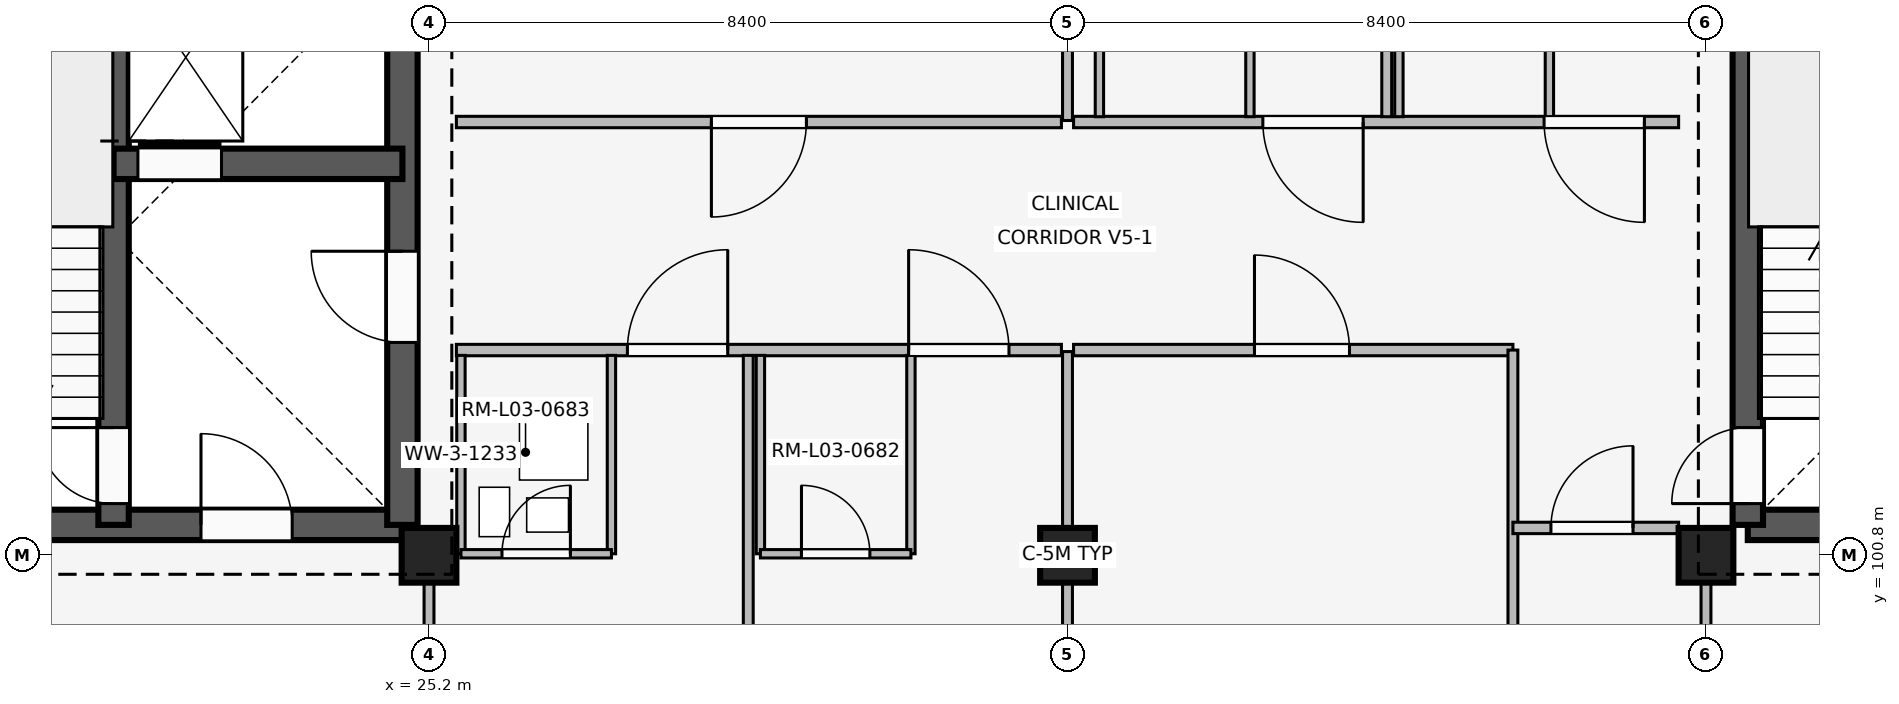
"""IFC4 building model, lengths in metres.
Left out: names, types, materials, properties, quantities, classifications, styles, units other than length and angle.
Written with IfcOpenShell. Run it as: python <this file> out.ifc"""

import sys

from ifc_helpers import new_model, si_unit, direction, frame, frame_2d, origin, origin_2d, place, context, subcontext, project, spatial, rectangle, extrude, element, fill, save


model = new_model("IFC4")
c1 = context("Model", 3, precision=1e-05, world=origin(), true_north=direction((0.0, 1.0)))
c2 = subcontext(c1, "Body", "Model", "MODEL_VIEW")
j1 = project(units=[si_unit("LENGTHUNIT", "METRE"), si_unit("PLANEANGLEUNIT", "RADIAN")], contexts=[c1])
p1 = place(None, origin())
s1 = spatial("IfcSite", under=j1, at=p1, CompositionType="ELEMENT")
p2 = place(p1, origin())
s2 = spatial("IfcBuilding", under=s1, at=p2, CompositionType="ELEMENT")
p3 = place(p2, frame((0.0, 0.0, 12.9)))
s3 = spatial("IfcBuildingStorey", under=s2, at=p3, CompositionType="ELEMENT", Elevation=12.9)
for number, where, z_axis, x_axis in (
    (1, (25.2, 100.8, 0.0), (0.0, 0.0, 1.0), (1.0, 0.0, 0.0)),
    (2, (33.6, 100.8, 0.0), (0.0, 0.0, 1.0), (1.0, 0.0, 0.0)),
    (3, (42.0, 100.8, 0.0), (0.0, 0.0, 1.0), (1.0, 0.0, 0.0)),
):
    element("IfcColumn", number, at=place(p3, frame(where, z_axis=z_axis, x_axis=x_axis)), inside=s3, PredefinedType="COLUMN", context=c2, shape_type="SweptSolid", body=[
        extrude(rectangle(XDim=0.72, YDim=0.72, at=origin_2d()), origin(), (0.0, 0.0, 1.0), 3.3),
    ])
p4 = place(p3, frame((42.55, 101.2, 0.0), z_axis=(0.0, 0.0, 1.0), x_axis=(1.0, 0.0, 0.0)))
e4 = element("IfcWall", 4, at=p4, inside=s3, PredefinedType="SHEAR", context=c2, shape_type="SweptSolid", body=[
    extrude(rectangle(XDim=7.5, YDim=0.4, at=frame_2d((3.75, 0.0))), origin(), (0.0, 0.0, 1.0), 3.02),
])
p5 = place(p4, frame((4.85, 0.0, 0.0)))
e5 = element("IfcOpeningElement", 5, at=p5, cuts=e4, PredefinedType="OPENING", context=c2, shape_type="SweptSolid", body=[
    extrude(rectangle(XDim=1.2, YDim=2.2, at=frame_2d((0.6, 1.1))), frame((0.0, 0.21, 0.0), z_axis=(0.0, -1.0, 0.0), x_axis=(1.0, 0.0, 0.0)), (0.0, 0.0, 1.0), 0.42),
])
p6 = place(p3, frame((42.55, 101.2, 0.0), z_axis=(0.0, 0.0, 1.0), x_axis=(0.0, 1.0, 0.0)))
e6 = element("IfcWall", 6, at=p6, inside=s3, PredefinedType="SHEAR", context=c2, shape_type="SweptSolid", body=[
    extrude(rectangle(XDim=7.55, YDim=0.4, at=frame_2d((3.775, 0.0))), origin(), (0.0, 0.0, 1.0), 3.02),
])
p7 = place(p6, frame((0.28, 0.0, 0.0)))
e7 = element("IfcOpeningElement", 7, at=p7, cuts=e6, PredefinedType="OPENING", context=c2, shape_type="SweptSolid", body=[
    extrude(rectangle(XDim=1.0, YDim=2.15, at=frame_2d((0.5, 1.075))), frame((0.0, 0.21, 0.0), z_axis=(0.0, -1.0, 0.0), x_axis=(1.0, 0.0, 0.0)), (0.0, 0.0, 1.0), 0.42),
])
p8 = place(p3, frame((17.35, 101.2, 0.0), z_axis=(0.0, 0.0, 1.0), x_axis=(1.0, 0.0, 0.0)))
e8 = element("IfcWall", 8, at=p8, inside=s3, PredefinedType="SHEAR", context=c2, shape_type="SweptSolid", body=[
    extrude(rectangle(XDim=7.5, YDim=0.4, at=frame_2d((3.75, 0.0))), origin(), (0.0, 0.0, 1.0), 3.02),
])
p9 = place(p8, frame((4.85, 0.0, 0.0)))
e9 = element("IfcOpeningElement", 9, at=p9, cuts=e8, PredefinedType="OPENING", context=c2, shape_type="SweptSolid", body=[
    extrude(rectangle(XDim=1.2, YDim=2.2, at=frame_2d((0.6, 1.1))), frame((0.0, 0.21, 0.0), z_axis=(0.0, -1.0, 0.0), x_axis=(1.0, 0.0, 0.0)), (0.0, 0.0, 1.0), 0.42),
])
p10 = place(p3, frame((24.85, 101.2, 0.0), z_axis=(0.0, 0.0, 1.0), x_axis=(0.0, 1.0, 0.0)))
e10 = element("IfcWall", 10, at=p10, inside=s3, PredefinedType="SHEAR", context=c2, shape_type="SweptSolid", body=[
    extrude(rectangle(XDim=7.55, YDim=0.4, at=frame_2d((3.775, 0.0))), origin(), (0.0, 0.0, 1.0), 3.02),
])
p11 = place(p10, frame((2.4, 0.0, 0.0)))
e11 = element("IfcOpeningElement", 11, at=p11, cuts=e10, PredefinedType="OPENING", context=c2, shape_type="SweptSolid", body=[
    extrude(rectangle(XDim=1.2, YDim=2.2, at=frame_2d((0.6, 1.1))), frame((0.0, 0.21, 0.0), z_axis=(0.0, -1.0, 0.0), x_axis=(1.0, 0.0, 0.0)), (0.0, 0.0, 1.0), 0.42),
])
p12 = place(p3, frame((21.05, 101.2, 0.0), z_axis=(0.0, 0.0, 1.0), x_axis=(0.0, 1.0, 0.0)))
e12 = element("IfcWall", 12, at=p12, inside=s3, PredefinedType="SHEAR", context=c2, shape_type="SweptSolid", body=[
    extrude(rectangle(XDim=7.55, YDim=0.4, at=frame_2d((3.775, 0.0))), origin(), (0.0, 0.0, 1.0), 3.02),
])
p13 = place(p12, frame((0.28, 0.0, 0.0)))
e13 = element("IfcOpeningElement", 13, at=p13, cuts=e12, PredefinedType="OPENING", context=c2, shape_type="SweptSolid", body=[
    extrude(rectangle(XDim=1.0, YDim=2.15, at=frame_2d((0.5, 1.075))), frame((0.0, 0.21, 0.0), z_axis=(0.0, -1.0, 0.0), x_axis=(1.0, 0.0, 0.0)), (0.0, 0.0, 1.0), 0.42),
])
p14 = place(p3, frame((21.05, 105.95, 0.0), z_axis=(0.0, 0.0, 1.0), x_axis=(1.0, 0.0, 0.0)))
e14 = element("IfcWall", 14, at=p14, inside=s3, PredefinedType="SHEAR", context=c2, shape_type="SweptSolid", body=[
    extrude(rectangle(XDim=3.8, YDim=0.4, at=frame_2d((1.9, 0.0))), origin(), (0.0, 0.0, 1.0), 3.02),
])
p15 = place(p14, frame((0.32, 0.0, 0.0)))
e15 = element("IfcOpeningElement", 15, at=p15, cuts=e14, PredefinedType="OPENING", context=c2, shape_type="SweptSolid", body=[
    extrude(rectangle(XDim=1.1, YDim=2.15, at=frame_2d((0.55, 1.075))), frame((0.0, 0.21, 0.0), z_axis=(0.0, -1.0, 0.0), x_axis=(1.0, 0.0, 0.0)), (0.0, 0.0, 1.0), 0.42),
])
p16 = place(p3, frame((25.2, 92.54, 0.0), z_axis=(0.0, 0.0, 1.0), x_axis=(0.0, 1.0, 0.0)))
e16 = element("IfcWall", 16, at=p16, inside=s3, PredefinedType="PARTITIONING", context=c2, shape_type="SweptSolid", body=[
    extrude(rectangle(XDim=8.21, YDim=0.13, at=frame_2d((4.105, 0.0))), origin(), (0.0, 0.0, 1.0), 2.42),
])
p17 = place(p16, frame((3.64, 0.0, 0.0)))
e17 = element("IfcOpeningElement", 17, at=p17, cuts=e16, PredefinedType="OPENING", context=c2, shape_type="SweptSolid", body=[
    extrude(rectangle(XDim=1.08, YDim=2.15, at=frame_2d((0.54, 1.075))), frame((0.0, 0.075, 0.0), z_axis=(0.0, -1.0, 0.0), x_axis=(1.0, 0.0, 0.0)), (0.0, 0.0, 1.0), 0.15),
])
p18 = place(p3, frame((25.56, 103.5, 0.0), z_axis=(0.0, 0.0, 1.0), x_axis=(1.0, 0.0, 0.0)))
e18 = element("IfcWall", 18, at=p18, inside=s3, PredefinedType="PARTITIONING", context=c2, shape_type="SweptSolid", body=[
    extrude(rectangle(XDim=7.96, YDim=0.15, at=frame_2d((3.98, 0.0))), origin(), (0.0, 0.0, 1.0), 2.42),
])
p19 = place(p18, frame((2.25, 0.0, 0.0)))
e19 = element("IfcOpeningElement", 19, at=p19, cuts=e18, PredefinedType="OPENING", context=c2, shape_type="SweptSolid", body=[
    extrude(rectangle(XDim=1.32, YDim=2.25, at=frame_2d((0.66, 1.125))), frame((0.0, 0.085, 0.0), z_axis=(0.0, -1.0, 0.0), x_axis=(1.0, 0.0, 0.0)), (0.0, 0.0, 1.0), 0.17),
])
p20 = place(p18, frame((5.95, 0.0, 0.0)))
e20 = element("IfcOpeningElement", 20, at=p20, cuts=e18, PredefinedType="OPENING", context=c2, shape_type="SweptSolid", body=[
    extrude(rectangle(XDim=1.32, YDim=2.25, at=frame_2d((0.66, 1.125))), frame((0.0, 0.085, 0.0), z_axis=(0.0, -1.0, 0.0), x_axis=(1.0, 0.0, 0.0)), (0.0, 0.0, 1.0), 0.17),
])
p21 = place(p3, frame((29.4, 92.5, 0.0), z_axis=(0.0, 0.0, 1.0), x_axis=(0.0, 1.0, 0.0)))
e21 = element("IfcWall", 21, at=p21, inside=s3, PredefinedType="PARTITIONING", context=c2, shape_type="SweptSolid", body=[
    extrude(rectangle(XDim=10.93, YDim=0.13, at=frame_2d((5.465, 0.0))), origin(), (0.0, 0.0, 1.0), 2.42),
])
for number, where, z_axis, x_axis in (
    (22, (25.62, 100.82, 0.0), (0.0, 0.0, 1.0), (0.0, 1.0, 0.0)),
    (23, (27.6, 100.82, 0.0), (0.0, 0.0, 1.0), (0.0, 1.0, 0.0)),
):
    element("IfcWall", number, at=place(p3, frame(where, z_axis=z_axis, x_axis=x_axis)), inside=s3, PredefinedType="PARTITIONING", context=c2, shape_type="SweptSolid", body=[
        extrude(rectangle(XDim=2.61, YDim=0.11, at=frame_2d((1.305, 0.0))), origin(), (0.0, 0.0, 1.0), 2.42),
    ])
p22 = place(p3, frame((25.62, 100.82, 0.0), z_axis=(0.0, 0.0, 1.0), x_axis=(1.0, 0.0, 0.0)))
e24 = element("IfcWall", 24, at=p22, inside=s3, PredefinedType="PARTITIONING", context=c2, shape_type="SweptSolid", body=[
    extrude(rectangle(XDim=1.98, YDim=0.11, at=frame_2d((0.99, 0.0))), origin(), (0.0, 0.0, 1.0), 2.42),
])
p23 = place(p22, frame((0.54, 0.0, 0.0)))
e25 = element("IfcOpeningElement", 25, at=p23, cuts=e24, PredefinedType="OPENING", context=c2, shape_type="SweptSolid", body=[
    extrude(rectangle(XDim=0.9, YDim=2.1, at=frame_2d((0.45, 1.05))), frame((0.0, 0.065, 0.0), z_axis=(0.0, -1.0, 0.0), x_axis=(1.0, 0.0, 0.0)), (0.0, 0.0, 1.0), 0.13),
])
for number, where, z_axis, x_axis in (
    (26, (29.56, 100.82, 0.0), (0.0, 0.0, 1.0), (0.0, 1.0, 0.0)),
    (27, (31.54, 100.82, 0.0), (0.0, 0.0, 1.0), (0.0, 1.0, 0.0)),
):
    element("IfcWall", number, at=place(p3, frame(where, z_axis=z_axis, x_axis=x_axis)), inside=s3, PredefinedType="PARTITIONING", context=c2, shape_type="SweptSolid", body=[
        extrude(rectangle(XDim=2.61, YDim=0.11, at=frame_2d((1.305, 0.0))), origin(), (0.0, 0.0, 1.0), 2.42),
    ])
p24 = place(p3, frame((29.56, 100.82, 0.0), z_axis=(0.0, 0.0, 1.0), x_axis=(1.0, 0.0, 0.0)))
e28 = element("IfcWall", 28, at=p24, inside=s3, PredefinedType="PARTITIONING", context=c2, shape_type="SweptSolid", body=[
    extrude(rectangle(XDim=1.98, YDim=0.11, at=frame_2d((0.99, 0.0))), origin(), (0.0, 0.0, 1.0), 2.42),
])
p25 = place(p24, frame((0.54, 0.0, 0.0)))
e29 = element("IfcOpeningElement", 29, at=p25, cuts=e28, PredefinedType="OPENING", context=c2, shape_type="SweptSolid", body=[
    extrude(rectangle(XDim=0.9, YDim=2.1, at=frame_2d((0.45, 1.05))), frame((0.0, 0.065, 0.0), z_axis=(0.0, -1.0, 0.0), x_axis=(1.0, 0.0, 0.0)), (0.0, 0.0, 1.0), 0.13),
])
p26 = place(p3, frame((33.52, 106.5, 0.0), z_axis=(0.0, 0.0, 1.0), x_axis=(-1.0, 0.0, 0.0)))
e30 = element("IfcWall", 30, at=p26, inside=s3, PredefinedType="PARTITIONING", context=c2, shape_type="SweptSolid", body=[
    extrude(rectangle(XDim=7.96, YDim=0.15, at=frame_2d((3.98, 0.0))), origin(), (0.0, 0.0, 1.0), 2.42),
])
p27 = place(p26, frame((3.355, 0.0, 0.0)))
e31 = element("IfcOpeningElement", 31, at=p27, cuts=e30, PredefinedType="OPENING", context=c2, shape_type="SweptSolid", body=[
    extrude(rectangle(XDim=1.25, YDim=2.2, at=frame_2d((0.625, 1.1))), frame((0.0, 0.085, 0.0), z_axis=(0.0, -1.0, 0.0), x_axis=(1.0, 0.0, 0.0)), (0.0, 0.0, 1.0), 0.17),
])
for number, where, z_axis, x_axis in (
    (32, (33.6, 92.54, 0.0), (0.0, 0.0, 1.0), (0.0, 1.0, 0.0)),
    (33, (33.6, 106.52, 0.0), (0.0, 0.0, 1.0), (0.0, 1.0, 0.0)),
):
    element("IfcWall", number, at=place(p3, frame(where, z_axis=z_axis, x_axis=x_axis)), inside=s3, PredefinedType="PARTITIONING", context=c2, shape_type="SweptSolid", body=[
        extrude(rectangle(XDim=10.94, YDim=0.13, at=frame_2d((5.47, 0.0))), origin(), (0.0, 0.0, 1.0), 2.42),
    ])
p28 = place(p3, frame((33.68, 103.5, 0.0), z_axis=(0.0, 0.0, 1.0), x_axis=(1.0, 0.0, 0.0)))
e34 = element("IfcWall", 34, at=p28, inside=s3, PredefinedType="PARTITIONING", context=c2, shape_type="SweptSolid", body=[
    extrude(rectangle(XDim=5.78, YDim=0.15, at=frame_2d((2.89, 0.0))), origin(), (0.0, 0.0, 1.0), 2.42),
])
p29 = place(p28, frame((2.38, 0.0, 0.0)))
e35 = element("IfcOpeningElement", 35, at=p29, cuts=e34, PredefinedType="OPENING", context=c2, shape_type="SweptSolid", body=[
    extrude(rectangle(XDim=1.25, YDim=2.2, at=frame_2d((0.625, 1.1))), frame((0.0, 0.085, 0.0), z_axis=(0.0, -1.0, 0.0), x_axis=(1.0, 0.0, 0.0)), (0.0, 0.0, 1.0), 0.17),
])
p30 = place(p3, frame((39.46, 92.56, 0.0), z_axis=(0.0, 0.0, 1.0), x_axis=(0.0, 1.0, 0.0)))
e36 = element("IfcWall", 36, at=p30, inside=s3, PredefinedType="PARTITIONING", context=c2, shape_type="SweptSolid", body=[
    extrude(rectangle(XDim=10.94, YDim=0.13, at=frame_2d((5.47, 0.0))), origin(), (0.0, 0.0, 1.0), 2.42),
])
p31 = place(p3, frame((39.46, 101.16, 0.0), z_axis=(0.0, 0.0, 1.0), x_axis=(1.0, 0.0, 0.0)))
e37 = element("IfcWall", 37, at=p31, inside=s3, PredefinedType="PARTITIONING", context=c2, shape_type="SweptSolid", body=[
    extrude(rectangle(XDim=2.18, YDim=0.15, at=frame_2d((1.09, 0.0))), origin(), (0.0, 0.0, 1.0), 2.42),
])
p32 = place(p31, frame((0.5, 0.0, 0.0)))
e38 = element("IfcOpeningElement", 38, at=p32, cuts=e37, PredefinedType="OPENING", context=c2, shape_type="SweptSolid", body=[
    extrude(rectangle(XDim=1.08, YDim=2.15, at=frame_2d((0.54, 1.075))), frame((0.0, 0.085, 0.0), z_axis=(0.0, -1.0, 0.0), x_axis=(1.0, 0.0, 0.0)), (0.0, 0.0, 1.0), 0.17),
])
p33 = place(p3, frame((41.64, 106.5, 0.0), z_axis=(0.0, 0.0, 1.0), x_axis=(-1.0, 0.0, 0.0)))
e39 = element("IfcWall", 39, at=p33, inside=s3, PredefinedType="PARTITIONING", context=c2, shape_type="SweptSolid", body=[
    extrude(rectangle(XDim=7.96, YDim=0.15, at=frame_2d((3.98, 0.0))), origin(), (0.0, 0.0, 1.0), 2.42),
])
p34 = place(p33, frame((0.45, 0.0, 0.0)))
e40 = element("IfcOpeningElement", 40, at=p34, cuts=e39, PredefinedType="OPENING", context=c2, shape_type="SweptSolid", body=[
    extrude(rectangle(XDim=1.32, YDim=2.25, at=frame_2d((0.66, 1.125))), frame((0.0, 0.085, 0.0), z_axis=(0.0, -1.0, 0.0), x_axis=(1.0, 0.0, 0.0)), (0.0, 0.0, 1.0), 0.17),
])
p35 = place(p33, frame((4.15, 0.0, 0.0)))
e41 = element("IfcOpeningElement", 41, at=p35, cuts=e39, PredefinedType="OPENING", context=c2, shape_type="SweptSolid", body=[
    extrude(rectangle(XDim=1.32, YDim=2.25, at=frame_2d((0.66, 1.125))), frame((0.0, 0.085, 0.0), z_axis=(0.0, -1.0, 0.0), x_axis=(1.0, 0.0, 0.0)), (0.0, 0.0, 1.0), 0.17),
])
p36 = place(p3, frame((37.8, 106.57, 0.0), z_axis=(0.0, 0.0, 1.0), x_axis=(0.0, 1.0, 0.0)))
e42 = element("IfcWall", 42, at=p36, inside=s3, PredefinedType="PARTITIONING", context=c2, shape_type="SweptSolid", body=[
    extrude(rectangle(XDim=10.93, YDim=0.13, at=frame_2d((5.465, 0.0))), origin(), (0.0, 0.0, 1.0), 2.42),
])
for number, where, z_axis, x_axis in (
    (43, (34.02, 106.57, 0.0), (0.0, 0.0, 1.0), (0.0, 1.0, 0.0)),
    (44, (36.0, 106.57, 0.0), (0.0, 0.0, 1.0), (0.0, 1.0, 0.0)),
    (45, (37.96, 106.57, 0.0), (0.0, 0.0, 1.0), (0.0, 1.0, 0.0)),
    (46, (39.94, 106.57, 0.0), (0.0, 0.0, 1.0), (0.0, 1.0, 0.0)),
):
    element("IfcWall", number, at=place(p3, frame(where, z_axis=z_axis, x_axis=x_axis)), inside=s3, PredefinedType="PARTITIONING", context=c2, shape_type="SweptSolid", body=[
        extrude(rectangle(XDim=2.61, YDim=0.11, at=frame_2d((1.305, 0.0))), origin(), (0.0, 0.0, 1.0), 2.42),
    ])
p37 = place(p3, frame((42.0, 92.54, 0.0), z_axis=(0.0, 0.0, 1.0), x_axis=(0.0, 1.0, 0.0)))
e47 = element("IfcWall", 47, at=p37, inside=s3, PredefinedType="PARTITIONING", context=c2, shape_type="SweptSolid", body=[
    extrude(rectangle(XDim=8.21, YDim=0.13, at=frame_2d((4.105, 0.0))), origin(), (0.0, 0.0, 1.0), 2.42),
])
p38 = place(p37, frame((3.64, 0.0, 0.0)))
e48 = element("IfcOpeningElement", 48, at=p38, cuts=e47, PredefinedType="OPENING", context=c2, shape_type="SweptSolid", body=[
    extrude(rectangle(XDim=1.08, YDim=2.15, at=frame_2d((0.54, 1.075))), frame((0.0, 0.075, 0.0), z_axis=(0.0, -1.0, 0.0), x_axis=(1.0, 0.0, 0.0)), (0.0, 0.0, 1.0), 0.15),
])
p39 = place(p7, origin())
e49 = element("IfcDoor", 49, at=p39, inside=s3, OperationType="SINGLE_SWING_LEFT", PredefinedType="DOOR", context=c2, shape_type="SweptSolid", body=[
    extrude(rectangle(XDim=1.0, YDim=2.15, at=frame_2d((0.5, 1.075))), frame((0.0, 0.025, 0.0), z_axis=(0.0, -1.0, 0.0), x_axis=(1.0, 0.0, 0.0)), (0.0, 0.0, 1.0), 0.05),
])
fill(e7, e49)
p40 = place(p11, origin())
e50 = element("IfcDoor", 50, at=p40, inside=s3, OperationType="SINGLE_SWING_RIGHT", PredefinedType="DOOR", context=c2, shape_type="SweptSolid", body=[
    extrude(rectangle(XDim=1.2, YDim=2.2, at=frame_2d((0.6, 1.1))), frame((0.0, 0.025, 0.0), z_axis=(0.0, -1.0, 0.0), x_axis=(1.0, 0.0, 0.0)), (0.0, 0.0, 1.0), 0.05),
])
fill(e11, e50)
p41 = place(p9, origin())
e51 = element("IfcDoor", 51, at=p41, inside=s3, OperationType="SINGLE_SWING_LEFT", PredefinedType="DOOR", context=c2, shape_type="SweptSolid", body=[
    extrude(rectangle(XDim=1.2, YDim=2.2, at=frame_2d((0.6, 1.1))), frame((0.0, 0.025, 0.0), z_axis=(0.0, -1.0, 0.0), x_axis=(1.0, 0.0, 0.0)), (0.0, 0.0, 1.0), 0.05),
])
fill(e9, e51)
p42 = place(p13, origin())
e52 = element("IfcDoor", 52, at=p42, inside=s3, OperationType="SINGLE_SWING_RIGHT", PredefinedType="DOOR", context=c2, shape_type="SweptSolid", body=[
    extrude(rectangle(XDim=1.0, YDim=2.15, at=frame_2d((0.5, 1.075))), frame((0.0, 0.025, 0.0), z_axis=(0.0, -1.0, 0.0), x_axis=(1.0, 0.0, 0.0)), (0.0, 0.0, 1.0), 0.05),
])
fill(e13, e52)
p43 = place(p15, origin())
e53 = element("IfcDoor", 53, at=p43, inside=s3, OperationType="SLIDING_TO_LEFT", PredefinedType="DOOR", context=c2, shape_type="SweptSolid", body=[
    extrude(rectangle(XDim=1.1, YDim=2.15, at=frame_2d((0.55, 1.075))), frame((0.0, 0.025, 0.0), z_axis=(0.0, -1.0, 0.0), x_axis=(1.0, 0.0, 0.0)), (0.0, 0.0, 1.0), 0.05),
])
fill(e15, e53)
p44 = place(p19, origin())
e54 = element("IfcDoor", 54, at=p44, inside=s3, OperationType="SINGLE_SWING_RIGHT", PredefinedType="DOOR", context=c2, shape_type="SweptSolid", body=[
    extrude(rectangle(XDim=1.32, YDim=2.25, at=frame_2d((0.66, 1.125))), frame((0.0, 0.025, 0.0), z_axis=(0.0, -1.0, 0.0), x_axis=(1.0, 0.0, 0.0)), (0.0, 0.0, 1.0), 0.05),
])
fill(e19, e54)
p45 = place(p20, origin())
e55 = element("IfcDoor", 55, at=p45, inside=s3, OperationType="SINGLE_SWING_LEFT", PredefinedType="DOOR", context=c2, shape_type="SweptSolid", body=[
    extrude(rectangle(XDim=1.32, YDim=2.25, at=frame_2d((0.66, 1.125))), frame((0.0, 0.025, 0.0), z_axis=(0.0, -1.0, 0.0), x_axis=(1.0, 0.0, 0.0)), (0.0, 0.0, 1.0), 0.05),
])
fill(e20, e55)
p46 = place(p23, origin())
e56 = element("IfcDoor", 56, at=p46, inside=s3, OperationType="SINGLE_SWING_RIGHT", PredefinedType="DOOR", context=c2, shape_type="SweptSolid", body=[
    extrude(rectangle(XDim=0.9, YDim=2.1, at=frame_2d((0.45, 1.05))), frame((0.0, 0.025, 0.0), z_axis=(0.0, -1.0, 0.0), x_axis=(1.0, 0.0, 0.0)), (0.0, 0.0, 1.0), 0.05),
])
fill(e25, e56)
p47 = place(p25, origin())
e57 = element("IfcDoor", 57, at=p47, inside=s3, OperationType="SINGLE_SWING_LEFT", PredefinedType="DOOR", context=c2, shape_type="SweptSolid", body=[
    extrude(rectangle(XDim=0.9, YDim=2.1, at=frame_2d((0.45, 1.05))), frame((0.0, 0.025, 0.0), z_axis=(0.0, -1.0, 0.0), x_axis=(1.0, 0.0, 0.0)), (0.0, 0.0, 1.0), 0.05),
])
fill(e29, e57)
p48 = place(p27, origin())
e58 = element("IfcDoor", 58, at=p48, inside=s3, OperationType="SINGLE_SWING_RIGHT", PredefinedType="DOOR", context=c2, shape_type="SweptSolid", body=[
    extrude(rectangle(XDim=1.25, YDim=2.2, at=frame_2d((0.625, 1.1))), frame((0.0, 0.025, 0.0), z_axis=(0.0, -1.0, 0.0), x_axis=(1.0, 0.0, 0.0)), (0.0, 0.0, 1.0), 0.05),
])
fill(e31, e58)
p49 = place(p29, origin())
e59 = element("IfcDoor", 59, at=p49, inside=s3, OperationType="SINGLE_SWING_LEFT", PredefinedType="DOOR", context=c2, shape_type="SweptSolid", body=[
    extrude(rectangle(XDim=1.25, YDim=2.2, at=frame_2d((0.625, 1.1))), frame((0.0, 0.025, 0.0), z_axis=(0.0, -1.0, 0.0), x_axis=(1.0, 0.0, 0.0)), (0.0, 0.0, 1.0), 0.05),
])
fill(e35, e59)
p50 = place(p32, origin())
e60 = element("IfcDoor", 60, at=p50, inside=s3, OperationType="SINGLE_SWING_RIGHT", PredefinedType="DOOR", context=c2, shape_type="SweptSolid", body=[
    extrude(rectangle(XDim=1.08, YDim=2.15, at=frame_2d((0.54, 1.075))), frame((0.0, 0.025, 0.0), z_axis=(0.0, -1.0, 0.0), x_axis=(1.0, 0.0, 0.0)), (0.0, 0.0, 1.0), 0.05),
])
fill(e38, e60)
p51 = place(p34, origin())
e61 = element("IfcDoor", 61, at=p51, inside=s3, OperationType="SINGLE_SWING_LEFT", PredefinedType="DOOR", context=c2, shape_type="SweptSolid", body=[
    extrude(rectangle(XDim=1.32, YDim=2.25, at=frame_2d((0.66, 1.125))), frame((0.0, 0.025, 0.0), z_axis=(0.0, -1.0, 0.0), x_axis=(1.0, 0.0, 0.0)), (0.0, 0.0, 1.0), 0.05),
])
fill(e40, e61)
p52 = place(p35, origin())
e62 = element("IfcDoor", 62, at=p52, inside=s3, OperationType="SINGLE_SWING_LEFT", PredefinedType="DOOR", context=c2, shape_type="SweptSolid", body=[
    extrude(rectangle(XDim=1.32, YDim=2.25, at=frame_2d((0.66, 1.125))), frame((0.0, 0.025, 0.0), z_axis=(0.0, -1.0, 0.0), x_axis=(1.0, 0.0, 0.0)), (0.0, 0.0, 1.0), 0.05),
])
fill(e41, e62)
save(model, sys.argv[1])
